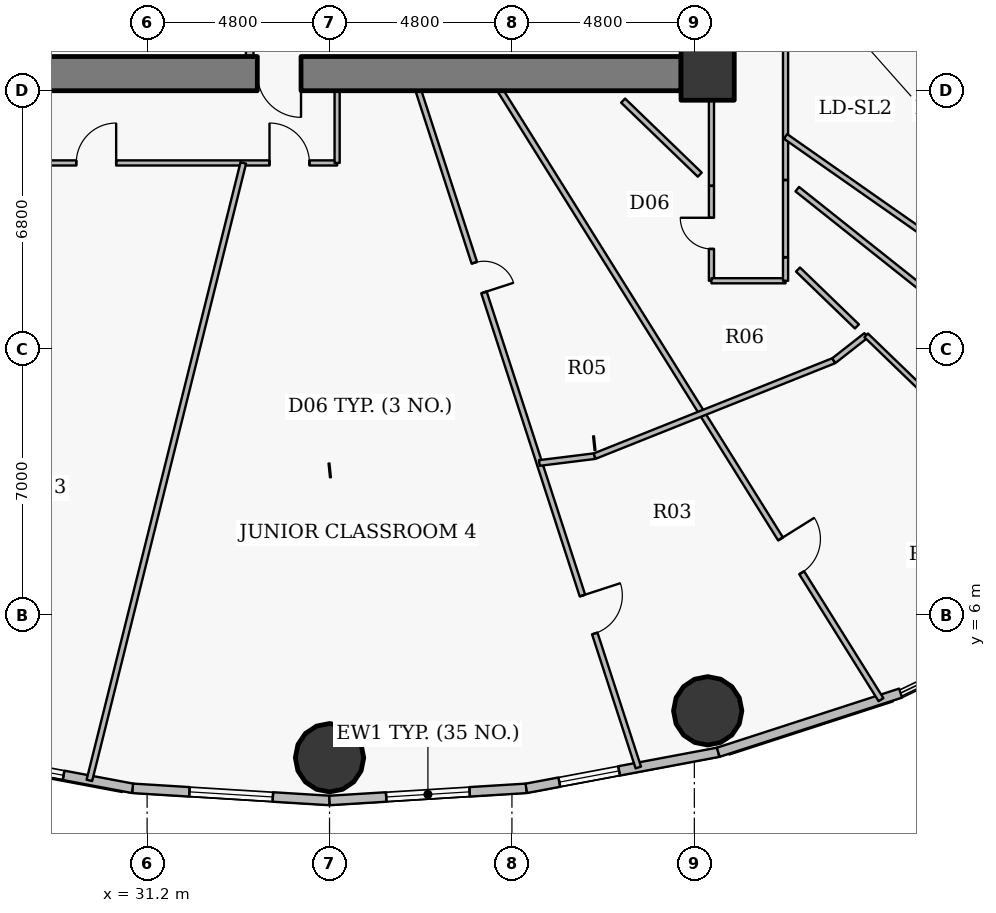
"""IFC4 building model, lengths in metres.
Left out: names, types, materials, properties, quantities, classifications, styles, units other than length and angle.
Written with IfcOpenShell. Run it as: python <this file> out.ifc"""

import sys

from ifc_helpers import new_model, si_unit, direction, frame, frame_2d, origin, origin_2d, place, context, subcontext, project, spatial, rectangle, hollow_circle, extrude, source, transform, mapped, element, fill, save


model = new_model("IFC4")
c1 = context("Model", 3, precision=1e-05, world=origin(), true_north=direction((0.0, 1.0)))
c2 = subcontext(c1, "Body", "Model", "MODEL_VIEW")
j1 = project(units=[si_unit("LENGTHUNIT", "METRE"), si_unit("PLANEANGLEUNIT", "RADIAN")], contexts=[c1])
p1 = place(None, origin())
s1 = spatial("IfcSite", under=j1, at=p1, CompositionType="ELEMENT")
p2 = place(p1, origin())
s2 = spatial("IfcBuilding", under=s1, at=p2, CompositionType="ELEMENT")
p3 = place(p2, frame((0.0, 0.0, 6.0)))
s3 = spatial("IfcBuildingStorey", under=s2, at=p3, CompositionType="ELEMENT", Elevation=6.0)
p4 = place(p3, frame((45.95, 20.25, 0.0), z_axis=(0.0, 0.0, 1.0), x_axis=(1.0, 0.0, 0.0)))
e1 = element("IfcColumn", 1, at=p4, inside=s3, PredefinedType="COLUMN", context=c2, shape_type="SweptSolid", body=[
    extrude(rectangle(XDim=1.4, YDim=1.4, at=origin_2d()), origin(), (0.0, 0.0, 1.0), 4.2),
])
p5 = place(p3, frame((45.25, 20.25, 0.0), z_axis=(0.0, 0.0, 1.0), x_axis=(-1.0, 0.0, 0.0)))
e2 = element("IfcWall", 2, at=p5, inside=s3, PredefinedType="SHEAR", context=c2, shape_type="SweptSolid", body=[
    extrude(rectangle(XDim=18.5, YDim=0.9, at=frame_2d((9.25, 0.0))), origin(), (0.0, 0.0, 1.0), 3.35),
])
p6 = place(p5, frame((10.0, 0.0, 0.0)))
e3 = element("IfcOpeningElement", 3, at=p6, cuts=e2, PredefinedType="OPENING", context=c2, shape_type="SweptSolid", body=[
    extrude(rectangle(XDim=1.15, YDim=2.15, at=origin_2d()), frame((0.575, 0.46, 1.075), z_axis=(0.0, -1.0, 0.0), x_axis=(1.0, 0.0, 0.0)), (0.0, 0.0, 1.0), 0.92),
])
for number, where, z_axis, x_axis in (
    (4, (36.0, 2.25, 0.0), (0.0, 0.0, 1.0), (1.0, 0.0, 0.0)),
    (5, (45.951, 3.484, 0.0), (0.0, 0.0, 1.0), (1.0, 0.0, 0.0)),
):
    element("IfcColumn", number, at=place(p3, frame(where, z_axis=z_axis, x_axis=x_axis)), inside=s3, PredefinedType="COLUMN", context=c2, shape_type="SweptSolid", body=[
        extrude(hollow_circle(Radius=0.9, WallThickness=0.05, at=origin_2d()), origin(), (0.0, 0.0, 1.0), 4.2),
    ])
p7 = place(p3, frame((30.822, 1.444, 0.0), z_axis=(0.0, 0.0, 1.0), x_axis=(-0.98278278947, 0.184764684726, 0.0)))
e6 = element("IfcWall", 6, at=p7, inside=s3, PredefinedType="SOLIDWALL", context=c2, shape_type="SweptSolid", body=[
    extrude(rectangle(XDim=5.139, YDim=0.25, at=frame_2d((2.569, 0.0))), origin(), (0.0, 0.0, 1.0), 3.9),
])
p8 = place(p7, frame((1.852, 0.0, 0.9)))
e7 = element("IfcOpeningElement", 7, at=p8, cuts=e6, PredefinedType="OPENING", context=c2, shape_type="SweptSolid", body=[
    extrude(rectangle(XDim=2.2, YDim=2.0, at=origin_2d()), frame((1.1, 0.135, 1.0), z_axis=(0.0, -1.0, 0.0), x_axis=(1.0, 0.0, 0.0)), (0.0, 0.0, 1.0), 0.27),
])
p9 = place(p3, frame((36.0, 1.125, 0.0), z_axis=(0.0, 0.0, 1.0), x_axis=(-0.998106762298, 0.061505211614, 0.0)))
e8 = element("IfcWall", 8, at=p9, inside=s3, PredefinedType="SOLIDWALL", context=c2, shape_type="SweptSolid", body=[
    extrude(rectangle(XDim=5.188, YDim=0.25, at=frame_2d((2.594, 0.0))), origin(), (0.0, 0.0, 1.0), 3.9),
])
p10 = place(p9, frame((1.494, 0.0, 0.9)))
e9 = element("IfcOpeningElement", 9, at=p10, cuts=e8, PredefinedType="OPENING", context=c2, shape_type="SweptSolid", body=[
    extrude(rectangle(XDim=2.2, YDim=2.0, at=origin_2d()), frame((1.1, 0.135, 1.0), z_axis=(0.0, -1.0, 0.0), x_axis=(1.0, 0.0, 0.0)), (0.0, 0.0, 1.0), 0.27),
])
p11 = place(p3, frame((41.178, 1.444, 0.0), z_axis=(0.0, 0.0, 1.0), x_axis=(-0.998106762298, -0.061505211614, 0.0)))
e10 = element("IfcWall", 10, at=p11, inside=s3, PredefinedType="SOLIDWALL", context=c2, shape_type="SweptSolid", body=[
    extrude(rectangle(XDim=5.188, YDim=0.25, at=frame_2d((2.594, 0.0))), origin(), (0.0, 0.0, 1.0), 3.9),
])
p12 = place(p11, frame((1.494, 0.0, 0.9)))
e11 = element("IfcOpeningElement", 11, at=p12, cuts=e10, PredefinedType="OPENING", context=c2, shape_type="SweptSolid", body=[
    extrude(rectangle(XDim=2.2, YDim=2.0, at=origin_2d()), frame((1.1, 0.135, 1.0), z_axis=(0.0, -1.0, 0.0), x_axis=(1.0, 0.0, 0.0)), (0.0, 0.0, 1.0), 0.27),
])
p13 = place(p3, frame((46.229, 2.394, 0.0), z_axis=(0.0, 0.0, 1.0), x_axis=(-0.98278278947, -0.184764684726, 0.0)))
e12 = element("IfcWall", 12, at=p13, inside=s3, PredefinedType="SOLIDWALL", context=c2, shape_type="SweptSolid", body=[
    extrude(rectangle(XDim=5.139, YDim=0.25, at=frame_2d((2.569, 0.0))), origin(), (0.0, 0.0, 1.0), 3.9),
])
p14 = place(p13, frame((2.654, 0.0, 0.9)))
e13 = element("IfcOpeningElement", 13, at=p14, cuts=e12, PredefinedType="OPENING", context=c2, shape_type="SweptSolid", body=[
    extrude(rectangle(XDim=1.6, YDim=1.75, at=origin_2d()), frame((0.8, 0.135, 0.875), z_axis=(0.0, -1.0, 0.0), x_axis=(1.0, 0.0, 0.0)), (0.0, 0.0, 1.0), 0.27),
])
p15 = place(p3, frame((51.026, 3.95, 0.0), z_axis=(0.0, 0.0, 1.0), x_axis=(-0.951198629726, -0.308579271513, 0.0)))
e14 = element("IfcWall", 14, at=p15, inside=s3, PredefinedType="SOLIDWALL", context=c2, shape_type="SweptSolid", body=[
    extrude(rectangle(XDim=5.044, YDim=0.25, at=frame_2d((2.522, 0.0))), origin(), (0.0, 0.0, 1.0), 3.9),
])
p16 = place(p3, frame((25.95, 17.9, 0.0), z_axis=(0.0, 0.0, 1.0), x_axis=(1.0, 0.0, 0.0)))
e15 = element("IfcWall", 15, at=p16, inside=s3, PredefinedType="PARTITIONING", context=c2, shape_type="SweptSolid", body=[
    extrude(rectangle(XDim=10.25, YDim=0.135, at=frame_2d((5.125, 0.0))), origin(), (0.0, 0.0, 1.0), 3.085),
])
p17 = place(p16, frame((3.385, 0.0, 0.0)))
e16 = element("IfcOpeningElement", 16, at=p17, cuts=e15, PredefinedType="OPENING", context=c2, shape_type="SweptSolid", body=[
    extrude(rectangle(XDim=1.05, YDim=2.15, at=origin_2d()), frame((0.525, 0.078, 1.075), z_axis=(0.0, -1.0, 0.0), x_axis=(1.0, 0.0, 0.0)), (0.0, 0.0, 1.0), 0.155),
])
p18 = place(p16, frame((8.471, 0.0, 0.0)))
e17 = element("IfcOpeningElement", 17, at=p18, cuts=e15, PredefinedType="OPENING", context=c2, shape_type="SweptSolid", body=[
    extrude(rectangle(XDim=1.05, YDim=2.15, at=origin_2d()), frame((0.525, 0.078, 1.075), z_axis=(0.0, -1.0, 0.0), x_axis=(1.0, 0.0, 0.0)), (0.0, 0.0, 1.0), 0.155),
])
p19 = place(p3, frame((29.68, 1.654, 0.0), z_axis=(0.0, 0.0, 1.0), x_axis=(0.241928320832, 0.970294124263, 0.0)))
e18 = element("IfcWall", 18, at=p19, inside=s3, PredefinedType="PARTITIONING", context=c2, shape_type="SweptSolid", body=[
    extrude(rectangle(XDim=16.744, YDim=0.15, at=frame_2d((8.372, 0.0))), origin(), (0.0, 0.0, 1.0), 3.285),
])
p20 = place(p3, frame((33.9, 20.7, 0.0), z_axis=(0.0, 0.0, 1.0), x_axis=(0.0, 1.0, 0.0)))
e19 = element("IfcWall", 19, at=p20, inside=s3, PredefinedType="PARTITIONING", context=c2, shape_type="SweptSolid", body=[
    extrude(rectangle(XDim=11.4, YDim=0.2, at=frame_2d((5.7, 0.0))), origin(), (0.0, 0.0, 1.0), 3.485),
])
p21 = place(p3, frame((36.2, 17.9, 0.0), z_axis=(0.0, 0.0, 1.0), x_axis=(0.0, 1.0, 0.0)))
e20 = element("IfcWall", 20, at=p21, inside=s3, PredefinedType="PARTITIONING", context=c2, shape_type="SweptSolid", body=[
    extrude(rectangle(XDim=1.9, YDim=0.135, at=frame_2d((0.95, 0.0))), origin(), (0.0, 0.0, 1.0), 3.085),
])
p22 = place(p3, frame((38.339, 19.8, 0.0), z_axis=(0.0, 0.0, 1.0), x_axis=(0.309020911431, -0.951055243557, 0.0)))
e21 = element("IfcWall", 21, at=p22, inside=s3, PredefinedType="PARTITIONING", context=c2, shape_type="SweptSolid", body=[
    extrude(rectangle(XDim=18.723, YDim=0.15, at=frame_2d((9.362, 0.0))), origin(), (0.0, 0.0, 1.0), 3.285),
])
p23 = place(p22, frame((4.76, 0.0, 0.0)))
e22 = element("IfcOpeningElement", 22, at=p23, cuts=e21, PredefinedType="OPENING", context=c2, shape_type="SweptSolid", body=[
    extrude(rectangle(XDim=0.82, YDim=2.1, at=origin_2d()), frame((0.41, 0.085, 1.05), z_axis=(0.0, -1.0, 0.0), x_axis=(1.0, 0.0, 0.0)), (0.0, 0.0, 1.0), 0.17),
])
p24 = place(p22, frame((13.966, 0.0, 0.0)))
e23 = element("IfcOpeningElement", 23, at=p24, cuts=e21, PredefinedType="OPENING", context=c2, shape_type="SweptSolid", body=[
    extrude(rectangle(XDim=1.05, YDim=2.15, at=origin_2d()), frame((0.525, 0.085, 1.075), z_axis=(0.0, -1.0, 0.0), x_axis=(1.0, 0.0, 0.0)), (0.0, 0.0, 1.0), 0.17),
])
p25 = place(p3, frame((40.499, 19.8, 0.0), z_axis=(0.0, 0.0, 1.0), x_axis=(0.529919953547, -0.848047665425, 0.0)))
e24 = element("IfcWall", 24, at=p25, inside=s3, PredefinedType="PARTITIONING", context=c2, shape_type="SweptSolid", body=[
    extrude(rectangle(XDim=18.893, YDim=0.15, at=frame_2d((9.447, 0.0))), origin(), (0.0, 0.0, 1.0), 3.285),
])
p26 = place(p25, frame((13.906, 0.0, 0.0)))
e25 = element("IfcOpeningElement", 25, at=p26, cuts=e24, PredefinedType="OPENING", context=c2, shape_type="SweptSolid", body=[
    extrude(rectangle(XDim=1.05, YDim=2.15, at=origin_2d()), frame((0.525, 0.085, 1.075), z_axis=(0.0, -1.0, 0.0), x_axis=(1.0, 0.0, 0.0)), (0.0, 0.0, 1.0), 0.17),
])
p27 = place(p3, frame((41.522, 10.005, 0.0), z_axis=(0.0, 0.0, 1.0), x_axis=(0.992392781159, 0.123112013644, 0.0)))
e26 = element("IfcWall", 26, at=p27, inside=s3, PredefinedType="PARTITIONING", context=c2, shape_type="SweptSolid", body=[
    extrude(rectangle(XDim=1.466, YDim=0.15, at=frame_2d((0.733, 0.0))), origin(), (0.0, 0.0, 1.0), 3.085),
])
p28 = place(p3, frame((42.976, 10.185, 0.0), z_axis=(0.0, 0.0, 1.0), x_axis=(0.928789451967, 0.370607816857, 0.0)))
e27 = element("IfcWall", 27, at=p28, inside=s3, PredefinedType="PARTITIONING", context=c2, shape_type="SweptSolid", body=[
    extrude(rectangle(XDim=6.776, YDim=0.15, at=frame_2d((3.388, 0.0))), origin(), (0.0, 0.0, 1.0), 3.085),
])
p29 = place(p3, frame((46.05, 14.8, 0.0), z_axis=(0.0, 0.0, 1.0), x_axis=(0.0, 1.0, 0.0)))
e28 = element("IfcWall", 28, at=p29, inside=s3, PredefinedType="PARTITIONING", context=c2, shape_type="SweptSolid", body=[
    extrude(rectangle(XDim=2.495, YDim=0.135, at=frame_2d((1.248, 0.0))), origin(), (0.0, 0.0, 1.0), 3.9),
])
p30 = place(p29, frame((0.837, 0.0, 0.0)))
e29 = element("IfcOpeningElement", 29, at=p30, cuts=e28, PredefinedType="OPENING", context=c2, shape_type="SweptSolid", body=[
    extrude(rectangle(XDim=0.82, YDim=2.1, at=origin_2d()), frame((0.41, 0.078, 1.05), z_axis=(0.0, -1.0, 0.0), x_axis=(1.0, 0.0, 0.0)), (0.0, 0.0, 1.0), 0.155),
])
p31 = place(p3, frame((46.05, 14.8, 0.0), z_axis=(0.0, 0.0, 1.0), x_axis=(1.0, 0.0, 0.0)))
e30 = element("IfcWall", 30, at=p31, inside=s3, PredefinedType="PARTITIONING", context=c2, shape_type="SweptSolid", body=[
    extrude(rectangle(XDim=1.95, YDim=0.135, at=frame_2d((0.975, 0.0))), origin(), (0.0, 0.0, 1.0), 3.9),
])
p32 = place(p3, frame((48.0, 14.8, 0.0), z_axis=(0.0, 0.0, 1.0), x_axis=(0.0, 1.0, 0.0)))
e31 = element("IfcWall", 31, at=p32, inside=s3, PredefinedType="PARTITIONING", context=c2, shape_type="SweptSolid", body=[
    extrude(rectangle(XDim=0.612, YDim=0.135, at=frame_2d((0.306, 0.0))), origin(), (0.0, 0.0, 1.0), 3.9),
])
p33 = place(p3, frame((48.0, 17.455, 0.0), z_axis=(0.0, 0.0, 1.0), x_axis=(0.0, 1.0, 0.0)))
e32 = element("IfcWall", 32, at=p33, inside=s3, PredefinedType="PARTITIONING", context=c2, shape_type="SweptSolid", body=[
    extrude(rectangle(XDim=3.545, YDim=0.135, at=frame_2d((1.772, 0.0))), origin(), (0.0, 0.0, 1.0), 3.085),
])
p34 = place(p3, frame((48.0, 18.597, 0.0), z_axis=(0.0, 0.0, 1.0), x_axis=(0.819153488973, -0.573574373123, 0.0)))
e33 = element("IfcWall", 33, at=p34, inside=s3, PredefinedType="PARTITIONING", context=c2, shape_type="SweptSolid", body=[
    extrude(rectangle(XDim=15.356, YDim=0.15, at=frame_2d((7.678, 0.0))), origin(), (0.0, 0.0, 1.0), 3.285),
])
p35 = place(p34, frame((7.268, 0.0, 0.0)))
e34 = element("IfcOpeningElement", 34, at=p35, cuts=e33, PredefinedType="OPENING", context=c2, shape_type="SweptSolid", body=[
    extrude(rectangle(XDim=0.82, YDim=2.1, at=origin_2d()), frame((0.41, 0.085, 1.05), z_axis=(0.0, -1.0, 0.0), x_axis=(1.0, 0.0, 0.0)), (0.0, 0.0, 1.0), 0.17),
])
p36 = place(p3, frame((49.27, 12.697, 0.0), z_axis=(0.0, 0.0, 1.0), x_axis=(0.787281025789, 0.616594345119, 0.0)))
e35 = element("IfcWall", 35, at=p36, inside=s3, PredefinedType="PARTITIONING", context=c2, shape_type="SweptSolid", body=[
    extrude(rectangle(XDim=1.081, YDim=0.15, at=frame_2d((0.541, 0.0))), origin(), (0.0, 0.0, 1.0), 3.9),
])
p37 = place(p3, frame((48.0, 17.445, 0.0), z_axis=(0.0, 0.0, 1.0), x_axis=(0.0, -1.0, 0.0)))
e36 = element("IfcWall", 36, at=p37, inside=s3, PredefinedType="PARTITIONING", context=c2, shape_type="SweptSolid", body=[
    extrude(rectangle(XDim=2.023, YDim=0.135, at=frame_2d((1.012, 0.0))), origin(), (0.0, 0.0, 1.0), 3.9),
])
p38 = place(p3, frame((46.05, 17.305, 0.0), z_axis=(0.0, 0.0, 1.0), x_axis=(0.0, 1.0, 0.0)))
e37 = element("IfcWall", 37, at=p38, inside=s3, PredefinedType="PARTITIONING", context=c2, shape_type="SweptSolid", body=[
    extrude(rectangle(XDim=2.495, YDim=0.135, at=frame_2d((1.248, 0.0))), origin(), (0.0, 0.0, 1.0), 3.085),
])
p39 = place(p3, frame((46.4, 19.8, 0.0), z_axis=(0.0, 0.0, 1.0), x_axis=(0.0, 1.0, 0.0)))
e38 = element("IfcWall", 38, at=p39, inside=s3, PredefinedType="PARTITIONING", context=c2, shape_type="SweptSolid", body=[
    extrude(rectangle(XDim=1.14, YDim=0.135, at=frame_2d((0.57, 0.0))), origin(), (0.0, 0.0, 1.0), 3.9),
])
p40 = place(p3, frame((43.725, 19.54, 0.0), z_axis=(0.0, 0.0, 1.0), x_axis=(0.719317456081, -0.69468150787, 0.0)))
e39 = element("IfcWall", 39, at=p40, inside=s3, PredefinedType="PARTITIONING", context=c2, shape_type="SweptSolid", body=[
    extrude(rectangle(XDim=2.804, YDim=0.15, at=frame_2d((1.402, 0.0))), origin(), (0.0, 0.0, 1.0), 3.9),
])
p41 = place(p3, frame((48.327, 15.095, 0.0), z_axis=(0.0, 0.0, 1.0), x_axis=(0.719401460617, -0.6945945137, 0.0)))
e40 = element("IfcWall", 40, at=p41, inside=s3, PredefinedType="PARTITIONING", context=c2, shape_type="SweptSolid", body=[
    extrude(rectangle(XDim=2.155, YDim=0.15, at=frame_2d((1.078, 0.0))), origin(), (0.0, 0.0, 1.0), 3.9),
])
p42 = place(p3, frame((50.121, 13.363, 0.0), z_axis=(0.0, 0.0, 1.0), x_axis=(0.719341799646, -0.69465630011, 0.0)))
e41 = element("IfcWall", 41, at=p42, inside=s3, PredefinedType="PARTITIONING", context=c2, shape_type="SweptSolid", body=[
    extrude(rectangle(XDim=9.237, YDim=0.135, at=frame_2d((4.619, 0.0))), origin(), (0.0, 0.0, 1.0), 3.285),
])
p43 = place(p3, frame((59.18, 8.562, 0.0), z_axis=(0.0, 0.0, 1.0), x_axis=(-0.782605918506, 0.622517450614, 0.0)))
e42 = element("IfcWall", 42, at=p43, inside=s3, PredefinedType="PARTITIONING", context=c2, shape_type="SweptSolid", body=[
    extrude(rectangle(XDim=13.893, YDim=0.15, at=frame_2d((6.947, 0.0))), origin(), (0.0, 0.0, 1.0), 3.285),
])
m1 = source(origin(), c2, "Body", "SweptSolid", [
    extrude(rectangle(XDim=2.2, YDim=2.0, at=origin_2d()), frame((1.1, 0.03, 1.0), z_axis=(0.0, -1.0, 0.0), x_axis=(1.0, 0.0, 0.0)), (0.0, 0.0, 1.0), 0.06),
])
p44 = place(p8, origin())
e43 = element("IfcWindow", 43, at=p44, inside=s3, PartitioningType="TRIPLE_PANEL_VERTICAL", PredefinedType="WINDOW", context=c2, shape_type="MappedRepresentation", body=[
    mapped(m1, transform((0.0, 0.0, 0.0), x_axis=(1.0, 0.0, 0.0), y_axis=(0.0, 1.0, 0.0), z_axis=(0.0, 0.0, 1.0), scale=1.0)),
])
fill(e7, e43)
p45 = place(p10, origin())
e44 = element("IfcWindow", 44, at=p45, inside=s3, PartitioningType="TRIPLE_PANEL_VERTICAL", PredefinedType="WINDOW", context=c2, shape_type="MappedRepresentation", body=[
    mapped(m1, transform((0.0, 0.0, 0.0), x_axis=(1.0, 0.0, 0.0), y_axis=(0.0, 1.0, 0.0), z_axis=(0.0, 0.0, 1.0), scale=1.0)),
])
fill(e9, e44)
p46 = place(p12, origin())
e45 = element("IfcWindow", 45, at=p46, inside=s3, PartitioningType="TRIPLE_PANEL_VERTICAL", PredefinedType="WINDOW", context=c2, shape_type="MappedRepresentation", body=[
    mapped(m1, transform((0.0, 0.0, 0.0), x_axis=(1.0, 0.0, 0.0), y_axis=(0.0, 1.0, 0.0), z_axis=(0.0, 0.0, 1.0), scale=1.0)),
])
fill(e11, e45)
m2 = source(origin(), c2, "Body", "SweptSolid", [
    extrude(rectangle(XDim=1.6, YDim=1.75, at=origin_2d()), frame((0.8, 0.03, 0.875), z_axis=(0.0, -1.0, 0.0), x_axis=(1.0, 0.0, 0.0)), (0.0, 0.0, 1.0), 0.06),
])
p47 = place(p14, origin())
e46 = element("IfcWindow", 46, at=p47, inside=s3, PartitioningType="DOUBLE_PANEL_VERTICAL", PredefinedType="WINDOW", context=c2, shape_type="MappedRepresentation", body=[
    mapped(m2, transform((0.0, 0.0, 0.0), x_axis=(1.0, 0.0, 0.0), y_axis=(0.0, 1.0, 0.0), z_axis=(0.0, 0.0, 1.0), scale=1.0)),
])
fill(e13, e46)
m3 = source(origin(), c2, "Body", "SweptSolid", [
    extrude(rectangle(XDim=1.15, YDim=2.15, at=origin_2d()), frame((0.575, 0.025, 1.075), z_axis=(0.0, -1.0, 0.0), x_axis=(1.0, 0.0, 0.0)), (0.0, 0.0, 1.0), 0.05),
])
p48 = place(p6, origin())
e47 = element("IfcDoor", 47, at=p48, inside=s3, OperationType="SINGLE_SWING_LEFT", PredefinedType="DOOR", context=c2, shape_type="MappedRepresentation", body=[
    mapped(m3, transform((0.0, 0.0, 0.0), x_axis=(1.0, 0.0, 0.0), y_axis=(0.0, 1.0, 0.0), z_axis=(0.0, 0.0, 1.0), scale=1.0)),
])
fill(e3, e47)
m4 = source(origin(), c2, "Body", "SweptSolid", [
    extrude(rectangle(XDim=1.05, YDim=2.15, at=origin_2d()), frame((0.525, 0.025, 1.075), z_axis=(0.0, -1.0, 0.0), x_axis=(1.0, 0.0, 0.0)), (0.0, 0.0, 1.0), 0.05),
])
p49 = place(p17, origin())
e48 = element("IfcDoor", 48, at=p49, inside=s3, OperationType="SINGLE_SWING_RIGHT", PredefinedType="DOOR", context=c2, shape_type="MappedRepresentation", body=[
    mapped(m4, transform((0.0, 0.0, 0.0), x_axis=(1.0, 0.0, 0.0), y_axis=(0.0, 1.0, 0.0), z_axis=(0.0, 0.0, 1.0), scale=1.0)),
])
fill(e16, e48)
p50 = place(p18, origin())
e49 = element("IfcDoor", 49, at=p50, inside=s3, OperationType="SINGLE_SWING_LEFT", PredefinedType="DOOR", context=c2, shape_type="MappedRepresentation", body=[
    mapped(m4, transform((0.0, 0.0, 0.0), x_axis=(1.0, 0.0, 0.0), y_axis=(0.0, 1.0, 0.0), z_axis=(0.0, 0.0, 1.0), scale=1.0)),
])
fill(e17, e49)
m5 = source(origin(), c2, "Body", "SweptSolid", [
    extrude(rectangle(XDim=0.82, YDim=2.1, at=origin_2d()), frame((0.41, 0.025, 1.05), z_axis=(0.0, -1.0, 0.0), x_axis=(1.0, 0.0, 0.0)), (0.0, 0.0, 1.0), 0.05),
])
p51 = place(p23, origin())
e50 = element("IfcDoor", 50, at=p51, inside=s3, OperationType="SINGLE_SWING_RIGHT", PredefinedType="DOOR", context=c2, shape_type="MappedRepresentation", body=[
    mapped(m5, transform((0.0, 0.0, 0.0), x_axis=(1.0, 0.0, 0.0), y_axis=(0.0, 1.0, 0.0), z_axis=(0.0, 0.0, 1.0), scale=1.0)),
])
fill(e22, e50)
p52 = place(p24, origin())
e51 = element("IfcDoor", 51, at=p52, inside=s3, OperationType="SINGLE_SWING_LEFT", PredefinedType="DOOR", context=c2, shape_type="MappedRepresentation", body=[
    mapped(m4, transform((0.0, 0.0, 0.0), x_axis=(1.0, 0.0, 0.0), y_axis=(0.0, 1.0, 0.0), z_axis=(0.0, 0.0, 1.0), scale=1.0)),
])
fill(e23, e51)
p53 = place(p30, origin())
e52 = element("IfcDoor", 52, at=p53, inside=s3, OperationType="SINGLE_SWING_RIGHT", PredefinedType="DOOR", context=c2, shape_type="MappedRepresentation", body=[
    mapped(m5, transform((0.0, 0.0, 0.0), x_axis=(1.0, 0.0, 0.0), y_axis=(0.0, 1.0, 0.0), z_axis=(0.0, 0.0, 1.0), scale=1.0)),
])
fill(e29, e52)
p54 = place(p26, origin())
e53 = element("IfcDoor", 53, at=p54, inside=s3, OperationType="SINGLE_SWING_LEFT", PredefinedType="DOOR", context=c2, shape_type="MappedRepresentation", body=[
    mapped(m4, transform((0.0, 0.0, 0.0), x_axis=(1.0, 0.0, 0.0), y_axis=(0.0, 1.0, 0.0), z_axis=(0.0, 0.0, 1.0), scale=1.0)),
])
fill(e25, e53)
save(model, sys.argv[1])
